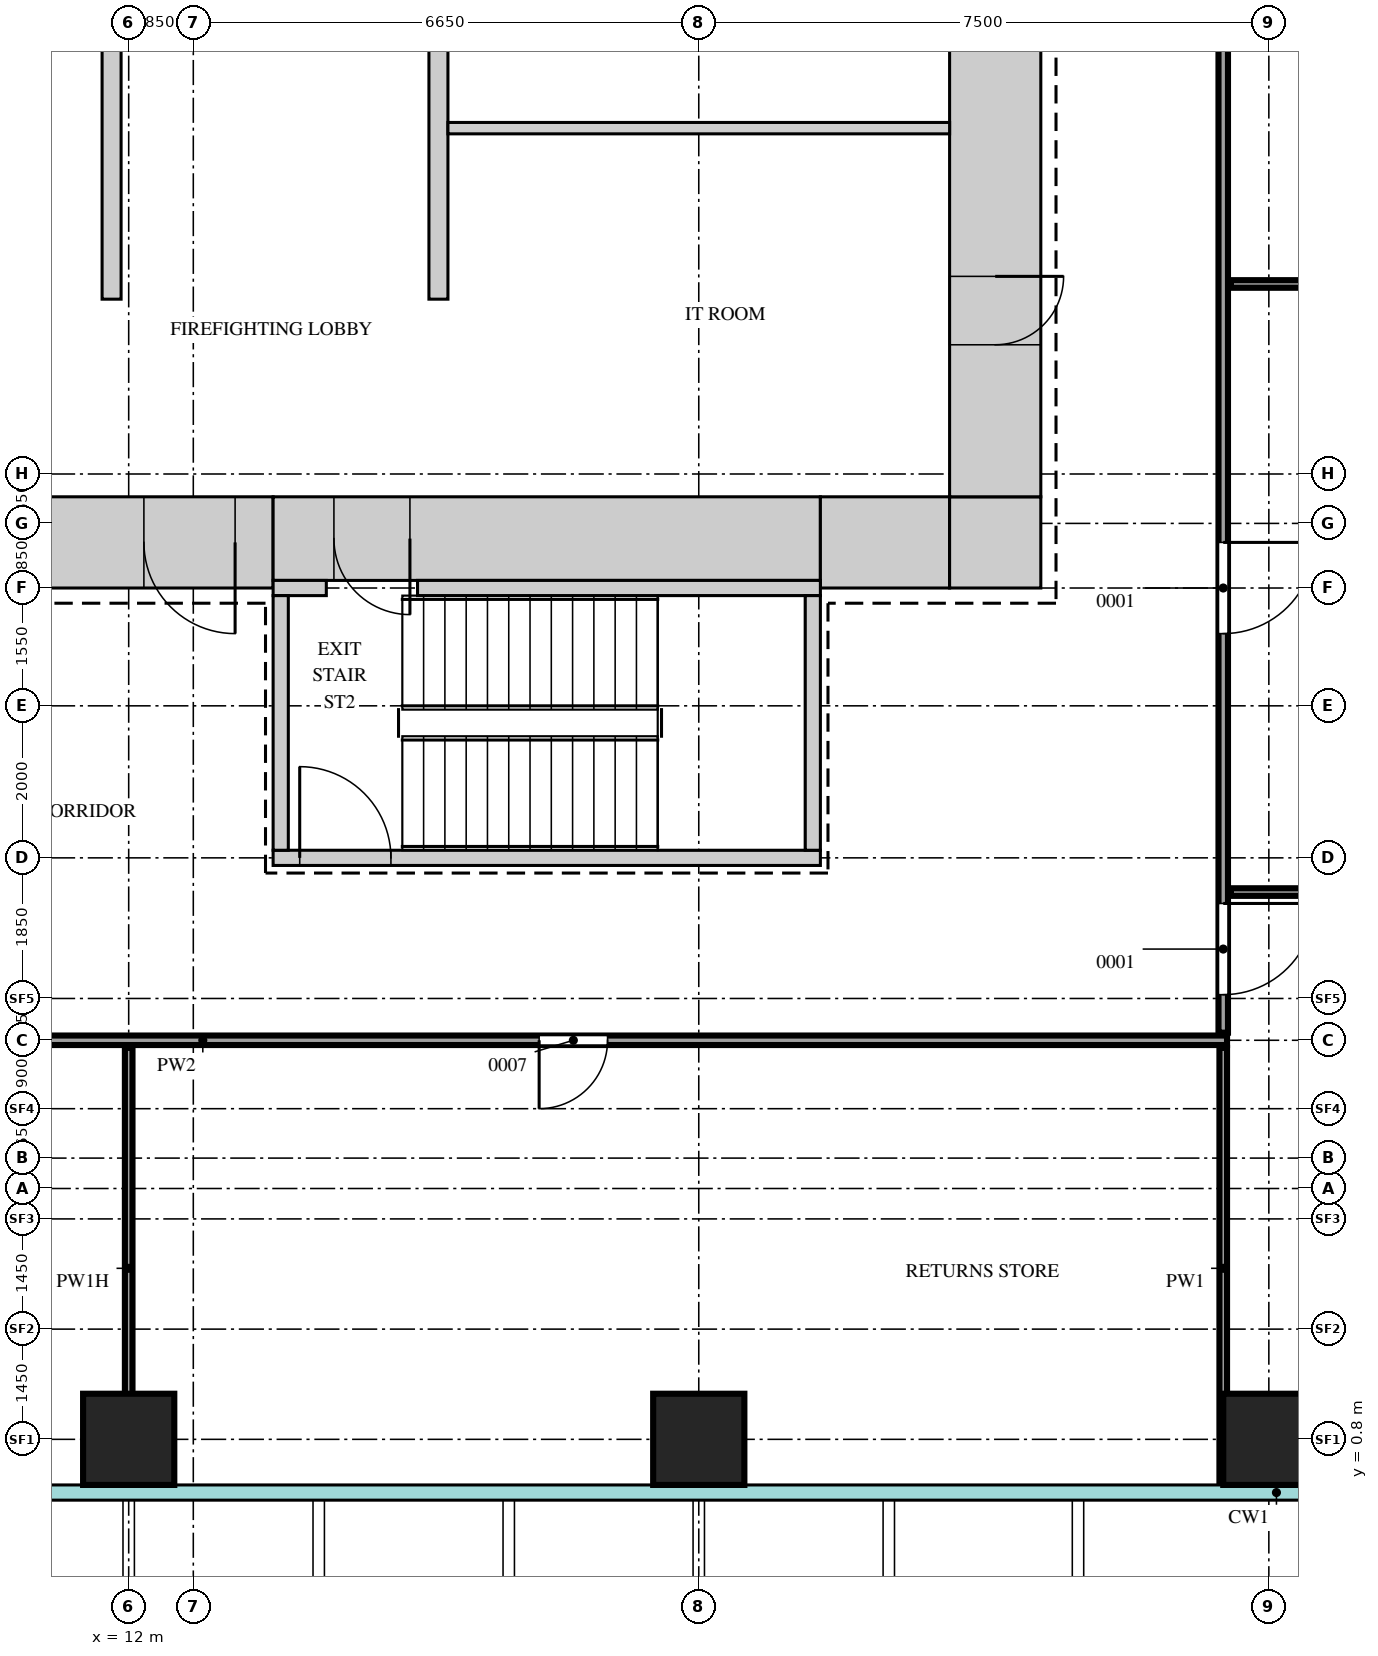
"""IFC4 building model, lengths in metres.
Left out: names, types, materials, properties, quantities, classifications, styles, units other than length and angle.
Written with IfcOpenShell. Run it as: python <this file> out.ifc"""

import sys

from ifc_helpers import new_model, si_unit, direction, frame, frame_2d, origin, origin_2d, place, context, subcontext, project, spatial, rectangle, extrude, source, transform, mapped, element, fill, save


model = new_model("IFC4")
c1 = context("Model", 3, precision=1e-05, world=origin(), true_north=direction((0.0, 1.0)))
c2 = subcontext(c1, "Body", "Model", "MODEL_VIEW")
j1 = project(units=[si_unit("LENGTHUNIT", "METRE"), si_unit("PLANEANGLEUNIT", "RADIAN")], contexts=[c1])
p1 = place(None, origin())
s1 = spatial("IfcSite", under=j1, at=p1, CompositionType="ELEMENT")
p2 = place(p1, origin())
s2 = spatial("IfcBuilding", under=s1, at=p2, CompositionType="ELEMENT")
p3 = place(p2, frame((0.0, 0.0, 87.0)))
s3 = spatial("IfcBuildingStorey", under=s2, at=p3, CompositionType="ELEMENT", Elevation=87.0)
m1 = source(origin(), c2, "Body", "SweptSolid", [
    extrude(rectangle(XDim=6.7, YDim=1.2, at=frame_2d((3.35, 0.0))), origin(), (0.0, 0.0, 1.0), 4.2),
])
p4 = place(p3, frame((7.2, 12.6, 0.0), z_axis=(0.0, 0.0, 1.0), x_axis=(1.0, 0.0, 0.0)))
e1 = element("IfcWall", 1, at=p4, inside=s3, PredefinedType="SHEAR", context=c2, shape_type="MappedRepresentation", body=[
    mapped(m1, transform((0.0, 0.0, 0.0))),
])
m2 = source(origin(), c2, "Body", "SweptSolid", [
    extrude(rectangle(XDim=1.2, YDim=2.1, at=frame_2d((0.6, 1.05))), frame((0.0, 0.61, 0.0), z_axis=(0.0, -1.0, 0.0), x_axis=(1.0, 0.0, 0.0)), (0.0, 0.0, 1.0), 1.22),
])
p5 = place(p4, frame((5.0, 0.0, 0.0)))
e2 = element("IfcOpeningElement", 2, at=p5, cuts=e1, PredefinedType="OPENING", context=c2, shape_type="MappedRepresentation", body=[
    mapped(m2, transform((0.0, 0.0, 0.0))),
])
p6 = place(p4, frame((1.65, 0.0, 0.0)))
e3 = element("IfcOpeningElement", 3, at=p6, cuts=e1, PredefinedType="OPENING", context=c2, shape_type="MappedRepresentation", body=[
    mapped(m2, transform((0.0, 0.0, 0.0))),
])
m3 = source(origin(), c2, "Body", "SweptSolid", [
    extrude(rectangle(XDim=7.2, YDim=1.1, at=frame_2d((3.6, 0.0))), origin(), (0.0, 0.0, 1.0), 4.2),
])
p7 = place(p3, frame((13.9, 12.65, 0.0), z_axis=(0.0, 0.0, 1.0), x_axis=(1.0, 0.0, 0.0)))
e4 = element("IfcWall", 4, at=p7, inside=s3, PredefinedType="SHEAR", context=c2, shape_type="MappedRepresentation", body=[
    mapped(m3, transform((0.0, 0.0, 0.0))),
])
m4 = source(origin(), c2, "Body", "SweptSolid", [
    extrude(rectangle(XDim=1.0, YDim=2.1, at=frame_2d((0.5, 1.05))), frame((0.0, 0.56, 0.0), z_axis=(0.0, -1.0, 0.0), x_axis=(1.0, 0.0, 0.0)), (0.0, 0.0, 1.0), 1.12),
])
p8 = place(p7, frame((0.8, 0.0, 0.0)))
e5 = element("IfcOpeningElement", 5, at=p8, cuts=e4, PredefinedType="OPENING", context=c2, shape_type="MappedRepresentation", body=[
    mapped(m4, transform((0.0, 0.0, 0.0))),
])
m5 = source(origin(), c2, "Body", "SweptSolid", [
    extrude(rectangle(XDim=1.7, YDim=1.2, at=frame_2d((0.85, 0.0))), origin(), (0.0, 0.0, 1.0), 4.2),
])
p9 = place(p3, frame((21.1, 12.6, 0.0), z_axis=(0.0, 0.0, 1.0), x_axis=(1.0, 0.0, 0.0)))
e6 = element("IfcWall", 6, at=p9, inside=s3, PredefinedType="SHEAR", context=c2, shape_type="MappedRepresentation", body=[
    mapped(m5, transform((0.0, 0.0, 0.0))),
])
m6 = source(origin(), c2, "Body", "SweptSolid", [
    extrude(rectangle(XDim=1.2, YDim=1.2, at=frame_2d((0.6, 0.0))), origin(), (0.0, 0.0, 1.0), 4.2),
])
p10 = place(p3, frame((22.8, 12.6, 0.0), z_axis=(0.0, 0.0, 1.0), x_axis=(1.0, 0.0, 0.0)))
e7 = element("IfcWall", 7, at=p10, inside=s3, PredefinedType="SHEAR", context=c2, shape_type="MappedRepresentation", body=[
    mapped(m6, transform((0.0, 0.0, 0.0))),
])
m7 = source(origin(), c2, "Body", "SweptSolid", [
    extrude(rectangle(XDim=27.6, YDim=1.2, at=frame_2d((13.8, 0.0))), origin(), (0.0, 0.0, 1.0), 4.2),
])
p11 = place(p3, frame((23.4, 13.2, 0.0), z_axis=(0.0, 0.0, 1.0), x_axis=(0.0, 1.0, 0.0)))
e8 = element("IfcWall", 8, at=p11, inside=s3, PredefinedType="SHEAR", context=c2, shape_type="MappedRepresentation", body=[
    mapped(m7, transform((0.0, 0.0, 0.0))),
])
m8 = source(origin(), c2, "Body", "SweptSolid", [
    extrude(rectangle(XDim=1.8, YDim=2.1, at=frame_2d((0.9, 1.05))), frame((0.0, 0.61, 0.0), z_axis=(0.0, -1.0, 0.0), x_axis=(1.0, 0.0, 0.0)), (0.0, 0.0, 1.0), 1.22),
])
p12 = place(p11, frame((22.4, 0.0, 0.0)))
e9 = element("IfcOpeningElement", 9, at=p12, cuts=e8, PredefinedType="OPENING", context=c2, shape_type="MappedRepresentation", body=[
    mapped(m8, transform((0.0, 0.0, 0.0))),
])
p13 = place(p11, frame((12.9, 0.0, 0.0)))
e10 = element("IfcOpeningElement", 10, at=p13, cuts=e8, PredefinedType="OPENING", context=c2, shape_type="MappedRepresentation", body=[
    mapped(m2, transform((0.0, 0.0, 0.0))),
])
m9 = source(origin(), c2, "Body", "SweptSolid", [
    extrude(rectangle(XDim=0.9, YDim=2.1, at=frame_2d((0.45, 1.05))), frame((0.0, 0.61, 0.0), z_axis=(0.0, -1.0, 0.0), x_axis=(1.0, 0.0, 0.0)), (0.0, 0.0, 1.0), 1.22),
])
p14 = place(p11, frame((2.0, 0.0, 0.0)))
e11 = element("IfcOpeningElement", 11, at=p14, cuts=e8, PredefinedType="OPENING", context=c2, shape_type="MappedRepresentation", body=[
    mapped(m9, transform((0.0, 0.0, 0.0))),
])
p15 = place(p11, frame((6.85, 0.0, 0.0)))
e12 = element("IfcOpeningElement", 12, at=p15, cuts=e8, PredefinedType="OPENING", context=c2, shape_type="MappedRepresentation", body=[
    mapped(m9, transform((0.0, 0.0, 0.0))),
])
m10 = source(origin(), c2, "Body", "SweptSolid", [
    extrude(rectangle(XDim=0.7, YDim=0.2, at=frame_2d((0.35, 0.0))), origin(), (0.0, 0.0, 1.0), 4.2),
])
p16 = place(p3, frame((13.9, 12.0, 0.0), z_axis=(0.0, 0.0, 1.0), x_axis=(1.0, 0.0, 0.0)))
e13 = element("IfcWall", 13, at=p16, inside=s3, PredefinedType="SHEAR", context=c2, shape_type="MappedRepresentation", body=[
    mapped(m10, transform((0.0, 0.0, 0.0))),
])
m11 = source(origin(), c2, "Body", "SweptSolid", [
    extrude(rectangle(XDim=5.3, YDim=0.2, at=frame_2d((2.65, 0.0))), origin(), (0.0, 0.0, 1.0), 4.2),
])
p17 = place(p3, frame((15.8, 12.0, 0.0), z_axis=(0.0, 0.0, 1.0), x_axis=(1.0, 0.0, 0.0)))
e14 = element("IfcWall", 14, at=p17, inside=s3, PredefinedType="SHEAR", context=c2, shape_type="MappedRepresentation", body=[
    mapped(m11, transform((0.0, 0.0, 0.0))),
])
m12 = source(origin(), c2, "Body", "SweptSolid", [
    extrude(rectangle(XDim=7.2, YDim=0.2, at=frame_2d((3.6, 0.0))), origin(), (0.0, 0.0, 1.0), 4.2),
])
p18 = place(p3, frame((13.9, 8.45, 0.0), z_axis=(0.0, 0.0, 1.0), x_axis=(1.0, 0.0, 0.0)))
e15 = element("IfcWall", 15, at=p18, inside=s3, PredefinedType="SHEAR", context=c2, shape_type="MappedRepresentation", body=[
    mapped(m12, transform((0.0, 0.0, 0.0))),
])
m13 = source(origin(), c2, "Body", "SweptSolid", [
    extrude(rectangle(XDim=1.2, YDim=2.1, at=frame_2d((0.6, 1.05))), frame((0.0, 0.11, 0.0), z_axis=(0.0, -1.0, 0.0), x_axis=(1.0, 0.0, 0.0)), (0.0, 0.0, 1.0), 0.22),
])
p19 = place(p18, frame((0.35, 0.0, 0.0)))
e16 = element("IfcOpeningElement", 16, at=p19, cuts=e15, PredefinedType="OPENING", context=c2, shape_type="MappedRepresentation", body=[
    mapped(m13, transform((0.0, 0.0, 0.0))),
])
m14 = source(origin(), c2, "Body", "SweptSolid", [
    extrude(rectangle(XDim=3.35, YDim=0.2, at=frame_2d((1.675, 0.0))), origin(), (0.0, 0.0, 1.0), 4.2),
])
for number, where, z_axis, x_axis in (
    (17, (21.0, 8.55, 0.0), (0.0, 0.0, 1.0), (0.0, 1.0, 0.0)),
    (18, (14.0, 8.55, 0.0), (0.0, 0.0, 1.0), (0.0, 1.0, 0.0)),
):
    element("IfcWall", number, at=place(p3, frame(where, z_axis=z_axis, x_axis=x_axis)), inside=s3, PredefinedType="SHEAR", context=c2, shape_type="MappedRepresentation", body=[
        mapped(m14, transform((0.0, 0.0, 0.0))),
    ])
m15 = source(origin(), c2, "Body", "SweptSolid", [
    extrude(rectangle(XDim=3.4, YDim=0.25, at=frame_2d((1.7, 0.0))), origin(), (0.0, 0.0, 1.0), 4.2),
])
for number, where, z_axis, x_axis in (
    (19, (16.075, 15.8, 0.0), (0.0, 0.0, 1.0), (0.0, 1.0, 0.0)),
    (20, (11.775, 15.8, 0.0), (0.0, 0.0, 1.0), (0.0, 1.0, 0.0)),
):
    element("IfcWall", number, at=place(p3, frame(where, z_axis=z_axis, x_axis=x_axis)), inside=s3, PredefinedType="STANDARD", context=c2, shape_type="MappedRepresentation", body=[
        mapped(m15, transform((0.0, 0.0, 0.0))),
    ])
m16 = source(origin(), c2, "Body", "SweptSolid", [
    extrude(rectangle(XDim=1.2, YDim=1.2, at=origin_2d()), origin(), (0.0, 0.0, 1.0), 4.2),
])
for number, where, z_axis, x_axis in (
    (21, (12.0, 0.8, 0.0), (0.0, 0.0, 1.0), (1.0, 0.0, 0.0)),
    (22, (19.5, 0.8, 0.0), (0.0, 0.0, 1.0), (1.0, 0.0, 0.0)),
    (23, (27.0, 0.8, 0.0), (0.0, 0.0, 1.0), (1.0, 0.0, 0.0)),
):
    element("IfcColumn", number, at=place(p3, frame(where, z_axis=z_axis, x_axis=x_axis)), inside=s3, PredefinedType="COLUMN", context=c2, shape_type="MappedRepresentation", body=[
        mapped(m16, transform((0.0, 0.0, 0.0))),
    ])
m17 = source(origin(), c2, "Body", "SweptSolid", [
    extrude(rectangle(XDim=5.8, YDim=0.1, at=frame_2d((2.9, 0.0))), origin(), (0.0, 0.0, 1.0), 3.7),
])
p20 = place(p3, frame((12.0, 0.15, 0.0), z_axis=(0.0, 0.0, 1.0), x_axis=(0.0, 1.0, 0.0)))
e24 = element("IfcWall", 24, at=p20, inside=s3, PredefinedType="PARTITIONING", context=c2, shape_type="MappedRepresentation", body=[
    mapped(m17, transform((0.0, 0.0, 0.0))),
])
m18 = source(origin(), c2, "Body", "SweptSolid", [
    extrude(rectangle(XDim=5.8, YDim=0.1, at=frame_2d((2.9, 0.0))), origin(), (0.0, 0.0, 1.0), 4.3),
])
p21 = place(p3, frame((26.4, 0.15, 0.0), z_axis=(0.0, 0.0, 1.0), x_axis=(0.0, 1.0, 0.0)))
e25 = element("IfcWall", 25, at=p21, inside=s3, PredefinedType="PARTITIONING", context=c2, shape_type="MappedRepresentation", body=[
    mapped(m18, transform((0.0, 0.0, 0.0))),
])
m19 = source(origin(), c2, "Body", "SweptSolid", [
    extrude(rectangle(XDim=22.3, YDim=0.125, at=frame_2d((11.15, 0.0))), origin(), (0.0, 0.0, 1.0), 4.3),
])
p22 = place(p3, frame((4.15, 6.05, 0.0), z_axis=(0.0, 0.0, 1.0), x_axis=(1.0, 0.0, 0.0)))
e26 = element("IfcWall", 26, at=p22, inside=s3, PredefinedType="PARTITIONING", context=c2, shape_type="MappedRepresentation", body=[
    mapped(m19, transform((0.0, 0.0, 0.0))),
])
m20 = source(origin(), c2, "Body", "SweptSolid", [
    extrude(rectangle(XDim=0.9, YDim=2.1, at=frame_2d((0.45, 1.05))), frame((0.0, 0.073, 0.0), z_axis=(0.0, -1.0, 0.0), x_axis=(1.0, 0.0, 0.0)), (0.0, 0.0, 1.0), 0.145),
])
p23 = place(p22, frame((3.5, 0.0, 0.0)))
e27 = element("IfcOpeningElement", 27, at=p23, cuts=e26, PredefinedType="OPENING", context=c2, shape_type="MappedRepresentation", body=[
    mapped(m20, transform((0.0, 0.0, 0.0))),
])
p24 = place(p22, frame((13.25, 0.0, 0.0)))
e28 = element("IfcOpeningElement", 28, at=p24, cuts=e26, PredefinedType="OPENING", context=c2, shape_type="MappedRepresentation", body=[
    mapped(m20, transform((0.0, 0.0, 0.0))),
])
m21 = source(origin(), c2, "Body", "SweptSolid", [
    extrude(rectangle(XDim=29.05, YDim=0.125, at=frame_2d((14.525, 0.0))), origin(), (0.0, 0.0, 1.0), 4.3),
])
p25 = place(p3, frame((26.4, 6.15, 0.0), z_axis=(0.0, 0.0, 1.0), x_axis=(0.0, 1.0, 0.0)))
e29 = element("IfcWall", 29, at=p25, inside=s3, PredefinedType="PARTITIONING", context=c2, shape_type="MappedRepresentation", body=[
    mapped(m21, transform((0.0, 0.0, 0.0))),
])
m22 = source(origin(), c2, "Body", "SweptSolid", [
    extrude(rectangle(XDim=1.2, YDim=2.1, at=frame_2d((0.6, 1.05))), frame((0.0, 0.073, 0.0), z_axis=(0.0, -1.0, 0.0), x_axis=(1.0, 0.0, 0.0)), (0.0, 0.0, 1.0), 0.145),
])
p26 = place(p25, frame((0.5, 0.0, 0.0)))
e30 = element("IfcOpeningElement", 30, at=p26, cuts=e29, PredefinedType="OPENING", context=c2, shape_type="MappedRepresentation", body=[
    mapped(m22, transform((0.0, 0.0, 0.0))),
])
p27 = place(p25, frame((5.25, 0.0, 0.0)))
e31 = element("IfcOpeningElement", 31, at=p27, cuts=e29, PredefinedType="OPENING", context=c2, shape_type="MappedRepresentation", body=[
    mapped(m22, transform((0.0, 0.0, 0.0))),
])
p28 = place(p25, frame((13.25, 0.0, 0.0)))
e32 = element("IfcOpeningElement", 32, at=p28, cuts=e29, PredefinedType="OPENING", context=c2, shape_type="MappedRepresentation", body=[
    mapped(m22, transform((0.0, 0.0, 0.0))),
])
m23 = source(origin(), c2, "Body", "SweptSolid", [
    extrude(rectangle(XDim=27.35, YDim=0.1, at=frame_2d((13.675, 0.0))), origin(), (0.0, 0.0, 1.0), 4.3),
])
for number, where, z_axis, x_axis in (
    (33, (26.5, 8.0, 0.0), (0.0, 0.0, 1.0), (1.0, 0.0, 0.0)),
    (34, (26.5, 16.0, 0.0), (0.0, 0.0, 1.0), (1.0, 0.0, 0.0)),
):
    element("IfcWall", number, at=place(p3, frame(where, z_axis=z_axis, x_axis=x_axis)), inside=s3, PredefinedType="PARTITIONING", context=c2, shape_type="MappedRepresentation", body=[
        mapped(m23, transform((0.0, 0.0, 0.0))),
    ])
m24 = source(origin(), c2, "Body", "SweptSolid", [
    extrude(rectangle(XDim=6.6, YDim=0.15, at=frame_2d((3.3, 0.0))), origin(), (0.0, 0.0, 1.0), 4.3),
])
p29 = place(p3, frame((16.2, 18.05, 0.0), z_axis=(0.0, 0.0, 1.0), x_axis=(1.0, 0.0, 0.0)))
e35 = element("IfcWall", 35, at=p29, inside=s3, PredefinedType="PARTITIONING", context=c2, shape_type="MappedRepresentation", body=[
    mapped(m24, transform((0.0, 0.0, 0.0))),
])
m25 = source(origin(), c2, "Body", "SweptSolid", [
    extrude(rectangle(XDim=0.9, YDim=2.1, at=frame_2d((0.45, 1.05))), frame((0.0, 0.55, 0.0), z_axis=(0.0, -1.0, 0.0), x_axis=(1.0, 0.0, 0.0)), (0.0, 0.0, 1.0), 1.1),
])
p30 = place(p14, origin())
e36 = element("IfcDoor", 36, at=p30, inside=s3, OperationType="SINGLE_SWING_RIGHT", PredefinedType="DOOR", context=c2, shape_type="MappedRepresentation", body=[
    mapped(m25, transform((0.0, 0.0, 0.0))),
])
fill(e11, e36)
m26 = source(origin(), c2, "Body", "SweptSolid", [
    extrude(rectangle(XDim=1.2, YDim=2.1, at=frame_2d((0.6, 1.05))), frame((0.0, 0.55, 0.0), z_axis=(0.0, -1.0, 0.0), x_axis=(1.0, 0.0, 0.0)), (0.0, 0.0, 1.0), 1.1),
])
p31 = place(p5, origin())
e37 = element("IfcDoor", 37, at=p31, inside=s3, OperationType="SINGLE_SWING_RIGHT", PredefinedType="DOOR", context=c2, shape_type="MappedRepresentation", body=[
    mapped(m26, transform((0.0, 0.0, 0.0))),
])
fill(e2, e37)
m27 = source(origin(), c2, "Body", "SweptSolid", [
    extrude(rectangle(XDim=1.0, YDim=2.1, at=frame_2d((0.5, 1.05))), frame((0.0, 0.5, 0.0), z_axis=(0.0, -1.0, 0.0), x_axis=(1.0, 0.0, 0.0)), (0.0, 0.0, 1.0), 1.0),
])
p32 = place(p8, origin())
e38 = element("IfcDoor", 38, at=p32, inside=s3, OperationType="SINGLE_SWING_RIGHT", PredefinedType="DOOR", context=c2, shape_type="MappedRepresentation", body=[
    mapped(m27, transform((0.0, 0.0, 0.0))),
])
fill(e5, e38)
m28 = source(origin(), c2, "Body", "SweptSolid", [
    extrude(rectangle(XDim=1.2, YDim=2.1, at=frame_2d((0.6, 1.05))), frame((0.0, 0.025, 0.0), z_axis=(0.0, -1.0, 0.0), x_axis=(1.0, 0.0, 0.0)), (0.0, 0.0, 1.0), 0.05),
])
p33 = place(p26, origin())
e39 = element("IfcDoor", 39, at=p33, inside=s3, OperationType="SINGLE_SWING_RIGHT", PredefinedType="DOOR", context=c2, shape_type="MappedRepresentation", body=[
    mapped(m28, transform((0.0, 0.0, 0.0))),
])
fill(e30, e39)
p34 = place(p27, origin())
e40 = element("IfcDoor", 40, at=p34, inside=s3, OperationType="SINGLE_SWING_RIGHT", PredefinedType="DOOR", context=c2, shape_type="MappedRepresentation", body=[
    mapped(m28, transform((0.0, 0.0, 0.0))),
])
fill(e31, e40)
m29 = source(origin(), c2, "Body", "SweptSolid", [
    extrude(rectangle(XDim=0.9, YDim=2.1, at=frame_2d((0.45, 1.05))), frame((0.0, 0.025, 0.0), z_axis=(0.0, -1.0, 0.0), x_axis=(1.0, 0.0, 0.0)), (0.0, 0.0, 1.0), 0.05),
])
p35 = place(p24, origin())
e41 = element("IfcDoor", 41, at=p35, inside=s3, OperationType="SINGLE_SWING_LEFT", PredefinedType="DOOR", context=c2, shape_type="MappedRepresentation", body=[
    mapped(m29, transform((0.0, 0.0, 0.0))),
])
fill(e28, e41)
p36 = place(p19, origin())
e42 = element("IfcDoor", 42, at=p36, inside=s3, OperationType="SINGLE_SWING_RIGHT", PredefinedType="DOOR", context=c2, shape_type="MappedRepresentation", body=[
    mapped(m28, transform((0.0, 0.0, 0.0))),
])
fill(e16, e42)
save(model, sys.argv[1])
